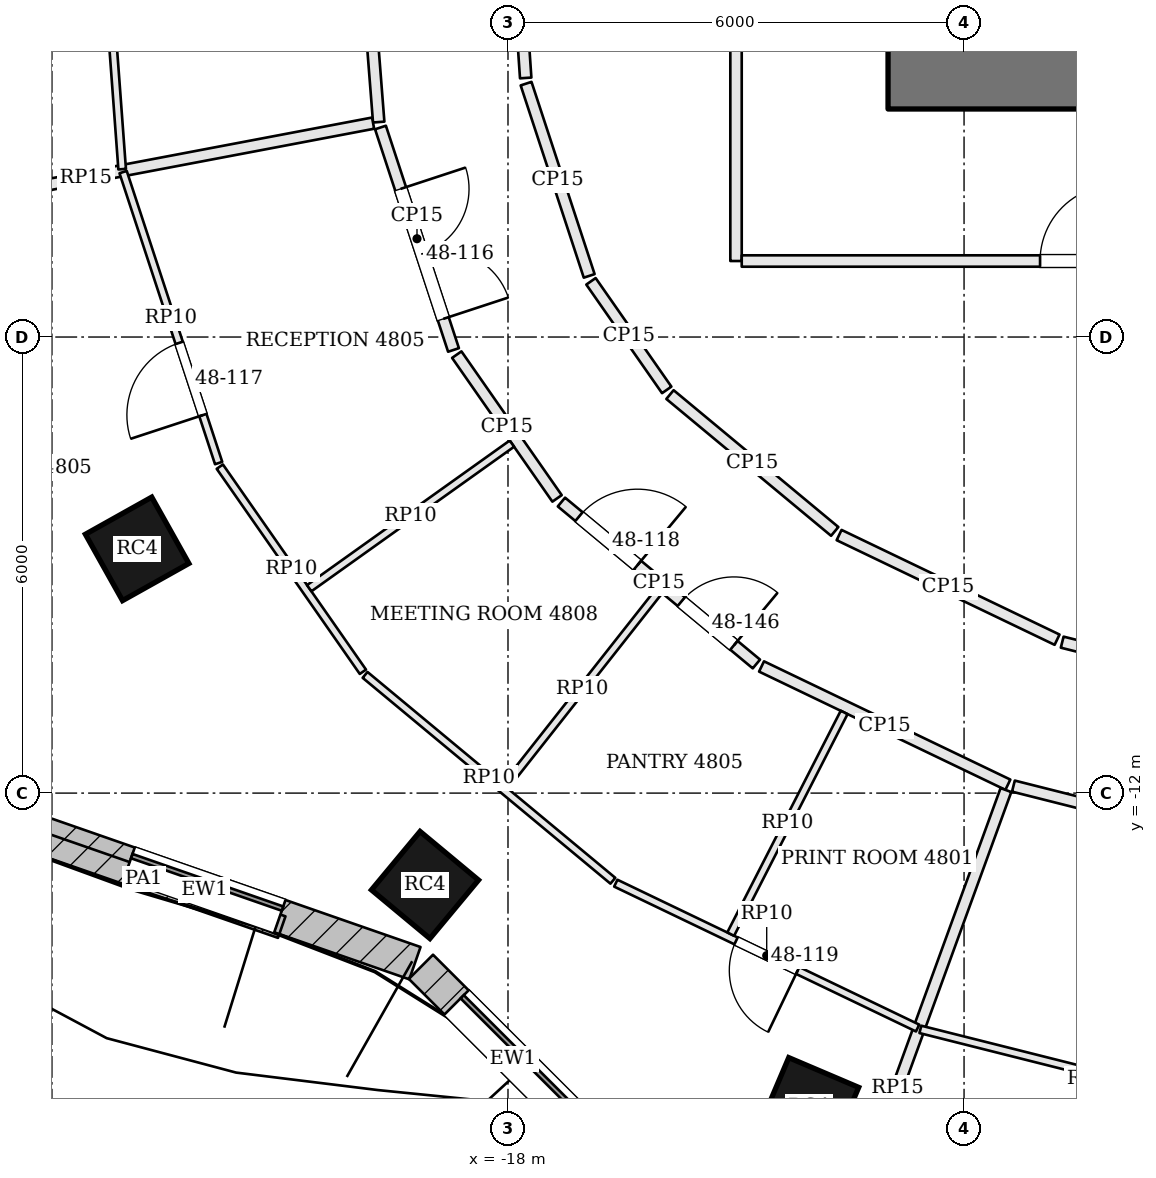
"""IFC4 building model, lengths in metres.
Left out: names, types, materials, properties, quantities, classifications, styles, units other than length and angle.
Written with IfcOpenShell. Run it as: python <this file> out.ifc"""

import sys

from ifc_helpers import new_model, si_unit, direction, frame, frame_2d, origin, origin_2d, place, context, subcontext, project, spatial, rectangle, extrude, element, fill, save


model = new_model("IFC4")
c1 = context("Model", 3, precision=1e-05, world=origin(), true_north=direction((0.0, 1.0)))
c2 = subcontext(c1, "Body", "Model", "MODEL_VIEW")
j1 = project(units=[si_unit("LENGTHUNIT", "METRE"), si_unit("PLANEANGLEUNIT", "RADIAN")], contexts=[c1])
p1 = place(None, origin())
s1 = spatial("IfcSite", under=j1, at=p1, CompositionType="ELEMENT")
p2 = place(p1, origin())
s2 = spatial("IfcBuilding", under=s1, at=p2, CompositionType="ELEMENT")
p3 = place(p2, frame((0.0, 0.0, 197.4)))
s3 = spatial("IfcBuildingStorey", under=s2, at=p3, CompositionType="ELEMENT", Elevation=197.4)
p4 = place(p3, frame((-13.0, -2.6, 0.0), z_axis=(0.0, 0.0, 1.0), x_axis=(1.0, 0.0, 0.0)))
e1 = element("IfcWall", 1, at=p4, inside=s3, PredefinedType="SHEAR", context=c2, shape_type="SweptSolid", body=[
    extrude(rectangle(XDim=26.0, YDim=0.8, at=frame_2d((13.0, 0.0))), origin(), (0.0, 0.0, 1.0), 3.9),
])
p5 = place(p4, frame((8.5, 0.0, 0.0)))
e2 = element("IfcOpeningElement", 2, at=p5, cuts=e1, PredefinedType="OPENING", context=c2, shape_type="SweptSolid", body=[
    extrude(rectangle(XDim=1.0, YDim=2.1, at=frame_2d((0.5, 1.05))), frame((0.0, 0.41, 0.0), z_axis=(0.0, -1.0, 0.0), x_axis=(1.0, 0.0, 0.0)), (0.0, 0.0, 1.0), 0.82),
])
p6 = place(p4, frame((11.025, 0.0, 0.0)))
e3 = element("IfcOpeningElement", 3, at=p6, cuts=e1, PredefinedType="OPENING", context=c2, shape_type="SweptSolid", body=[
    extrude(rectangle(XDim=0.9, YDim=2.1, at=frame_2d((0.45, 1.05))), frame((0.0, 0.41, 0.0), z_axis=(0.0, -1.0, 0.0), x_axis=(1.0, 0.0, 0.0)), (0.0, 0.0, 1.0), 0.82),
])
p7 = place(p4, frame((14.225, 0.0, 0.0)))
e4 = element("IfcOpeningElement", 4, at=p7, cuts=e1, PredefinedType="OPENING", context=c2, shape_type="SweptSolid", body=[
    extrude(rectangle(XDim=0.9, YDim=2.1, at=frame_2d((0.45, 1.05))), frame((0.0, 0.41, 0.0), z_axis=(0.0, -1.0, 0.0), x_axis=(1.0, 0.0, 0.0)), (0.0, 0.0, 1.0), 0.82),
])
p8 = place(p4, frame((16.6, 0.0, 0.0)))
e5 = element("IfcOpeningElement", 5, at=p8, cuts=e1, PredefinedType="OPENING", context=c2, shape_type="SweptSolid", body=[
    extrude(rectangle(XDim=1.0, YDim=2.1, at=frame_2d((0.5, 1.05))), frame((0.0, 0.41, 0.0), z_axis=(0.0, -1.0, 0.0), x_axis=(1.0, 0.0, 0.0)), (0.0, 0.0, 1.0), 0.82),
])
for number, where, z_axis, x_axis in (
    (6, (-22.879, -8.787, 0.0), (0.0, 0.0, 1.0), (0.489, -0.873, 0.0)),
    (7, (-19.092, -13.209, 0.0), (0.0, 0.0, 1.0), (0.769, -0.639, 0.0)),
    (8, (-14.042, -16.136, 0.0), (0.0, 0.0, 1.0), (0.92, -0.392, 0.0)),
):
    element("IfcColumn", number, at=place(p3, frame(where, z_axis=z_axis, x_axis=x_axis)), inside=s3, PredefinedType="COLUMN", context=c2, shape_type="SweptSolid", body=[
        extrude(rectangle(XDim=1.0, YDim=1.0, at=origin_2d()), origin(), (0.0, 0.0, 1.0), 3.9),
    ])
p9 = place(p3, frame((-24.761, -12.31, 0.0), z_axis=(0.0, 0.0, 1.0), x_axis=(0.944397305248, -0.328806523414, 0.0)))
e9 = element("IfcWall", 9, at=p9, inside=s3, PredefinedType="SOLIDWALL", context=c2, shape_type="SweptSolid", body=[
    extrude(rectangle(XDim=5.862, YDim=0.45, at=frame_2d((2.931, 0.0))), origin(), (0.0, 0.0, 1.0), 3.7),
])
p10 = place(p9, frame((1.881, 0.0, 0.9)))
e10 = element("IfcOpeningElement", 10, at=p10, cuts=e9, PredefinedType="OPENING", context=c2, shape_type="SweptSolid", body=[
    extrude(rectangle(XDim=2.1, YDim=2.3, at=frame_2d((1.05, 1.15))), frame((0.0, 0.235, 0.0), z_axis=(0.0, -1.0, 0.0), x_axis=(1.0, 0.0, 0.0)), (0.0, 0.0, 1.0), 0.47),
])
p11 = place(p3, frame((-19.145, -14.285, 0.0), z_axis=(0.0, 0.0, 1.0), x_axis=(0.707427521052, -0.706785895769, 0.0)))
e11 = element("IfcWall", 11, at=p11, inside=s3, PredefinedType="SOLIDWALL", context=c2, shape_type="SweptSolid", body=[
    extrude(rectangle(XDim=3.425, YDim=0.45, at=frame_2d((1.712, 0.0))), origin(), (0.0, 0.0, 1.0), 3.7),
])
p12 = place(p11, frame((0.662, 0.0, 0.9)))
e12 = element("IfcOpeningElement", 12, at=p12, cuts=e11, PredefinedType="OPENING", context=c2, shape_type="SweptSolid", body=[
    extrude(rectangle(XDim=2.1, YDim=2.3, at=frame_2d((1.05, 1.15))), frame((0.0, 0.235, 0.0), z_axis=(0.0, -1.0, 0.0), x_axis=(1.0, 0.0, 0.0)), (0.0, 0.0, 1.0), 0.47),
])
p13 = place(p3, frame((-24.605, -12.5, 3.9), z_axis=(0.0, 0.0, 1.0), x_axis=(0.944373295981, -0.328875474668, 0.0)))
e13 = element("IfcWall", 13, at=p13, inside=s3, PredefinedType="PARAPET", context=c2, shape_type="SweptSolid", body=[
    extrude(rectangle(XDim=3.842, YDim=0.3, at=frame_2d((1.921, 0.0))), origin(), (0.0, 0.0, 1.0), 1.1),
])
p14 = place(p3, frame((-19.943, -0.075, 0.0), z_axis=(0.0, 0.0, 1.0), x_axis=(0.07795234724, -0.996957086117, 0.0)))
e14 = element("IfcWall", 14, at=p14, inside=s3, PredefinedType="PARTITIONING", context=c2, shape_type="SweptSolid", body=[
    extrude(rectangle(XDim=3.107, YDim=0.15, at=frame_2d((1.553, 0.0))), origin(), (0.0, 0.0, 1.0), 3.084),
])
p15 = place(p14, frame((1.15, 0.0, 0.0)))
e15 = element("IfcOpeningElement", 15, at=p15, cuts=e14, PredefinedType="OPENING", context=c2, shape_type="SweptSolid", body=[
    extrude(rectangle(XDim=0.9, YDim=2.1, at=frame_2d((0.45, 1.05))), frame((0.0, 0.085, 0.0), z_axis=(0.0, -1.0, 0.0), x_axis=(1.0, 0.0, 0.0)), (0.0, 0.0, 1.0), 0.17),
])
p16 = place(p3, frame((-27.332, -4.618, 0.0), z_axis=(0.0, 0.0, 1.0), x_axis=(0.982506256139, 0.186229580485, 0.0)))
e16 = element("IfcWall", 16, at=p16, inside=s3, PredefinedType="PARTITIONING", context=c2, shape_type="SweptSolid", body=[
    extrude(rectangle(XDim=7.691, YDim=0.15, at=frame_2d((3.846, 0.0))), origin(), (0.0, 0.0, 1.0), 3.084),
])
p17 = place(p3, frame((-19.677, -3.243, 0.0), z_axis=(0.0, 0.0, 1.0), x_axis=(0.311873272737, -0.950123708657, 0.0)))
e17 = element("IfcWall", 17, at=p17, inside=s3, PredefinedType="PARTITIONING", context=c2, shape_type="SweptSolid", body=[
    extrude(rectangle(XDim=3.08, YDim=0.15, at=frame_2d((1.54, 0.0))), origin(), (0.0, 0.0, 1.0), 3.084),
])
p18 = place(p17, frame((0.85, 0.0, 0.0)))
e18 = element("IfcOpeningElement", 18, at=p18, cuts=e17, PredefinedType="OPENING", context=c2, shape_type="SweptSolid", body=[
    extrude(rectangle(XDim=1.8, YDim=2.1, at=frame_2d((0.9, 1.05))), frame((0.0, 0.085, 0.0), z_axis=(0.0, -1.0, 0.0), x_axis=(1.0, 0.0, 0.0)), (0.0, 0.0, 1.0), 0.17),
])
p19 = place(p3, frame((-18.674, -6.232, 0.0), z_axis=(0.0, 0.0, 1.0), x_axis=(0.572118665737, -0.820170855563, 0.0)))
e19 = element("IfcWall", 19, at=p19, inside=s3, PredefinedType="PARTITIONING", context=c2, shape_type="SweptSolid", body=[
    extrude(rectangle(XDim=2.306, YDim=0.15, at=frame_2d((1.153, 0.0))), origin(), (0.0, 0.0, 1.0), 3.084),
])
p20 = place(p3, frame((-17.297, -8.171, 0.0), z_axis=(0.0, 0.0, 1.0), x_axis=(0.769228575061, -0.638973707839, 0.0)))
e20 = element("IfcWall", 20, at=p20, inside=s3, PredefinedType="PARTITIONING", context=c2, shape_type="SweptSolid", body=[
    extrude(rectangle(XDim=3.334, YDim=0.15, at=frame_2d((1.667, 0.0))), origin(), (0.0, 0.0, 1.0), 3.084),
])
p21 = place(p20, frame((0.3, 0.0, 0.0)))
e21 = element("IfcOpeningElement", 21, at=p21, cuts=e20, PredefinedType="OPENING", context=c2, shape_type="SweptSolid", body=[
    extrude(rectangle(XDim=1.0, YDim=2.4, at=frame_2d((0.5, 1.2))), frame((0.0, 0.085, 0.0), z_axis=(0.0, -1.0, 0.0), x_axis=(1.0, 0.0, 0.0)), (0.0, 0.0, 1.0), 0.17),
])
p22 = place(p20, frame((2.05, 0.0, 0.0)))
e22 = element("IfcOpeningElement", 22, at=p22, cuts=e20, PredefinedType="OPENING", context=c2, shape_type="SweptSolid", body=[
    extrude(rectangle(XDim=0.9, YDim=2.1, at=frame_2d((0.45, 1.05))), frame((0.0, 0.085, 0.0), z_axis=(0.0, -1.0, 0.0), x_axis=(1.0, 0.0, 0.0)), (0.0, 0.0, 1.0), 0.17),
])
p23 = place(p3, frame((-14.664, -10.334, 0.0), z_axis=(0.0, 0.0, 1.0), x_axis=(0.901523057468, -0.432731067585, 0.0)))
e23 = element("IfcWall", 23, at=p23, inside=s3, PredefinedType="PARTITIONING", context=c2, shape_type="SweptSolid", body=[
    extrude(rectangle(XDim=3.595, YDim=0.15, at=frame_2d((1.797, 0.0))), origin(), (0.0, 0.0, 1.0), 3.084),
])
p24 = place(p3, frame((-14.301, -19.789, 0.0), z_axis=(0.0, 0.0, 1.0), x_axis=(0.34224178248, 0.939611921128, 0.0)))
e24 = element("IfcWall", 24, at=p24, inside=s3, PredefinedType="PARTITIONING", context=c2, shape_type="SweptSolid", body=[
    extrude(rectangle(XDim=8.332, YDim=0.15, at=frame_2d((4.166, 0.0))), origin(), (0.0, 0.0, 1.0), 3.084),
])
p25 = place(p3, frame((-11.351, -11.908, 0.0), z_axis=(0.0, 0.0, 1.0), x_axis=(0.969630935796, -0.244572787421, 0.0)))
e25 = element("IfcWall", 25, at=p25, inside=s3, PredefinedType="PARTITIONING", context=c2, shape_type="SweptSolid", body=[
    extrude(rectangle(XDim=4.68, YDim=0.15, at=frame_2d((2.34, 0.0))), origin(), (0.0, 0.0, 1.0), 3.084),
])
p26 = place(p25, frame((1.751, 0.0, 0.0)))
e26 = element("IfcOpeningElement", 26, at=p26, cuts=e25, PredefinedType="OPENING", context=c2, shape_type="SweptSolid", body=[
    extrude(rectangle(XDim=1.8, YDim=2.1, at=frame_2d((0.9, 1.05))), frame((0.0, 0.085, 0.0), z_axis=(0.0, -1.0, 0.0), x_axis=(1.0, 0.0, 0.0)), (0.0, 0.0, 1.0), 0.17),
])
p27 = place(p3, frame((-6.553, -11.056, 0.0), z_axis=(0.0, 0.0, 1.0), x_axis=(-0.970004917182, 0.243085294995, 0.0)))
e27 = element("IfcWall", 27, at=p27, inside=s3, PredefinedType="PARTITIONING", context=c2, shape_type="SweptSolid", body=[
    extrude(rectangle(XDim=4.284, YDim=0.15, at=frame_2d((2.142, 0.0))), origin(), (0.0, 0.0, 1.0), 3.084),
])
p28 = place(p3, frame((-10.776, -9.982, 0.0), z_axis=(0.0, 0.0, 1.0), x_axis=(-0.901511079436, 0.432756020933, 0.0)))
e28 = element("IfcWall", 28, at=p28, inside=s3, PredefinedType="PARTITIONING", context=c2, shape_type="SweptSolid", body=[
    extrude(rectangle(XDim=3.181, YDim=0.15, at=frame_2d((1.59, 0.0))), origin(), (0.0, 0.0, 1.0), 3.084),
])
p29 = place(p3, frame((-13.702, -8.557, 0.0), z_axis=(0.0, 0.0, 1.0), x_axis=(-0.769221825067, 0.638981833733, 0.0)))
e29 = element("IfcWall", 29, at=p29, inside=s3, PredefinedType="PARTITIONING", context=c2, shape_type="SweptSolid", body=[
    extrude(rectangle(XDim=2.817, YDim=0.15, at=frame_2d((1.409, 0.0))), origin(), (0.0, 0.0, 1.0), 3.084),
])
p30 = place(p3, frame((-15.912, -6.696, 0.0), z_axis=(0.0, 0.0, 1.0), x_axis=(-0.572078533763, 0.820198848578, 0.0)))
e30 = element("IfcWall", 30, at=p30, inside=s3, PredefinedType="PARTITIONING", context=c2, shape_type="SweptSolid", body=[
    extrude(rectangle(XDim=1.742, YDim=0.15, at=frame_2d((0.871, 0.0))), origin(), (0.0, 0.0, 1.0), 3.084),
])
p31 = place(p3, frame((-16.932, -5.196, 0.0), z_axis=(0.0, 0.0, 1.0), x_axis=(-0.311904957484, 0.950113307715, 0.0)))
e31 = element("IfcWall", 31, at=p31, inside=s3, PredefinedType="PARTITIONING", context=c2, shape_type="SweptSolid", body=[
    extrude(rectangle(XDim=2.662, YDim=0.15, at=frame_2d((1.331, 0.0))), origin(), (0.0, 0.0, 1.0), 3.084),
])
p32 = place(p3, frame((-17.767, -2.592, 0.0), z_axis=(0.0, 0.0, 1.0), x_axis=(-0.068140828228, 0.997675712608, 0.0)))
e32 = element("IfcWall", 32, at=p32, inside=s3, PredefinedType="PARTITIONING", context=c2, shape_type="SweptSolid", body=[
    extrude(rectangle(XDim=2.598, YDim=0.15, at=frame_2d((1.299, 0.0))), origin(), (0.0, 0.0, 1.0), 3.084),
])
p33 = place(p3, frame((-15.0, 7.423, 0.0), z_axis=(0.0, 0.0, 1.0), x_axis=(0.0, -1.0, 0.0)))
e33 = element("IfcWall", 33, at=p33, inside=s3, PredefinedType="PARTITIONING", context=c2, shape_type="SweptSolid", body=[
    extrude(rectangle(XDim=12.423, YDim=0.15, at=frame_2d((6.211, 0.0))), origin(), (0.0, 0.0, 1.0), 3.084),
])
p34 = place(p33, frame((3.174, 0.0, 0.0)))
e34 = element("IfcOpeningElement", 34, at=p34, cuts=e33, PredefinedType="OPENING", context=c2, shape_type="SweptSolid", body=[
    extrude(rectangle(XDim=1.0, YDim=2.1, at=frame_2d((0.5, 1.05))), frame((0.0, 0.085, 0.0), z_axis=(0.0, -1.0, 0.0), x_axis=(1.0, 0.0, 0.0)), (0.0, 0.0, 1.0), 0.17),
])
p35 = place(p3, frame((-14.925, -5.0, 0.0), z_axis=(0.0, 0.0, 1.0), x_axis=(1.0, 0.0, 0.0)))
e35 = element("IfcWall", 35, at=p35, inside=s3, PredefinedType="PARTITIONING", context=c2, shape_type="SweptSolid", body=[
    extrude(rectangle(XDim=29.925, YDim=0.15, at=frame_2d((14.962, 0.0))), origin(), (0.0, 0.0, 1.0), 3.084),
])
p36 = place(p35, frame((3.925, 0.0, 0.0)))
e36 = element("IfcOpeningElement", 36, at=p36, cuts=e35, PredefinedType="OPENING", context=c2, shape_type="SweptSolid", body=[
    extrude(rectangle(XDim=1.0, YDim=2.1, at=frame_2d((0.5, 1.05))), frame((0.0, 0.085, 0.0), z_axis=(0.0, -1.0, 0.0), x_axis=(1.0, 0.0, 0.0)), (0.0, 0.0, 1.0), 0.17),
])
p37 = place(p35, frame((14.025, 0.0, 0.0)))
e37 = element("IfcOpeningElement", 37, at=p37, cuts=e35, PredefinedType="OPENING", context=c2, shape_type="SweptSolid", body=[
    extrude(rectangle(XDim=1.8, YDim=2.1, at=frame_2d((0.9, 1.05))), frame((0.0, 0.085, 0.0), z_axis=(0.0, -1.0, 0.0), x_axis=(1.0, 0.0, 0.0)), (0.0, 0.0, 1.0), 0.17),
])
p38 = place(p35, frame((24.925, 0.0, 0.0)))
e38 = element("IfcOpeningElement", 38, at=p38, cuts=e35, PredefinedType="OPENING", context=c2, shape_type="SweptSolid", body=[
    extrude(rectangle(XDim=1.0, YDim=2.1, at=frame_2d((0.5, 1.05))), frame((0.0, 0.085, 0.0), z_axis=(0.0, -1.0, 0.0), x_axis=(1.0, 0.0, 0.0)), (0.0, 0.0, 1.0), 0.17),
])
p39 = place(p3, frame((-23.076, -3.792, 0.0), z_axis=(0.0, 0.0, 1.0), x_axis=(-0.073784165765, 0.99727423354, 0.0)))
e39 = element("IfcWall", 39, at=p39, inside=s3, PredefinedType="PARTITIONING", context=c2, shape_type="SweptSolid", body=[
    extrude(rectangle(XDim=3.802, YDim=0.1, at=frame_2d((1.901, 0.0))), origin(), (0.0, 0.0, 1.0), 3.084),
])
p40 = place(p39, frame((2.146, 0.0, 0.0)))
e40 = element("IfcOpeningElement", 40, at=p40, cuts=e39, PredefinedType="OPENING", context=c2, shape_type="SweptSolid", body=[
    extrude(rectangle(XDim=0.9, YDim=2.1, at=frame_2d((0.45, 1.05))), frame((0.0, 0.06, 0.0), z_axis=(0.0, -1.0, 0.0), x_axis=(1.0, 0.0, 0.0)), (0.0, 0.0, 1.0), 0.12),
])
p41 = place(p3, frame((-12.611, -15.091, 0.0), z_axis=(0.0, 0.0, 1.0), x_axis=(-0.901527382061, 0.432722057901, 0.0)))
e41 = element("IfcWall", 41, at=p41, inside=s3, PredefinedType="PARTITIONING", context=c2, shape_type="SweptSolid", body=[
    extrude(rectangle(XDim=4.405, YDim=0.1, at=frame_2d((2.202, 0.0))), origin(), (0.0, 0.0, 1.0), 3.084),
])
p42 = place(p41, frame((1.75, 0.0, 0.0)))
e42 = element("IfcOpeningElement", 42, at=p42, cuts=e41, PredefinedType="OPENING", context=c2, shape_type="SweptSolid", body=[
    extrude(rectangle(XDim=0.9, YDim=2.1, at=frame_2d((0.45, 1.05))), frame((0.0, 0.06, 0.0), z_axis=(0.0, -1.0, 0.0), x_axis=(1.0, 0.0, 0.0)), (0.0, 0.0, 1.0), 0.12),
])
p43 = place(p3, frame((-16.62, -13.153, 0.0), z_axis=(0.0, 0.0, 1.0), x_axis=(-0.76922129881, 0.638982467253, 0.0)))
e43 = element("IfcWall", 43, at=p43, inside=s3, PredefinedType="PARTITIONING", context=c2, shape_type="SweptSolid", body=[
    extrude(rectangle(XDim=4.238, YDim=0.1, at=frame_2d((2.119, 0.0))), origin(), (0.0, 0.0, 1.0), 3.084),
])
p44 = place(p3, frame((-19.909, -10.404, 0.0), z_axis=(0.0, 0.0, 1.0), x_axis=(-0.572111951901, 0.820175538828, 0.0)))
e44 = element("IfcWall", 44, at=p44, inside=s3, PredefinedType="PARTITIONING", context=c2, shape_type="SweptSolid", body=[
    extrude(rectangle(XDim=3.29, YDim=0.1, at=frame_2d((1.645, 0.0))), origin(), (0.0, 0.0, 1.0), 3.084),
])
p45 = place(p3, frame((-21.807, -7.658, 0.0), z_axis=(0.0, 0.0, 1.0), x_axis=(-0.31193452411, 0.950103601019, 0.0)))
e45 = element("IfcWall", 45, at=p45, inside=s3, PredefinedType="PARTITIONING", context=c2, shape_type="SweptSolid", body=[
    extrude(rectangle(XDim=4.029, YDim=0.1, at=frame_2d((2.015, 0.0))), origin(), (0.0, 0.0, 1.0), 3.084),
])
p46 = place(p45, frame((0.664, 0.0, 0.0)))
e46 = element("IfcOpeningElement", 46, at=p46, cuts=e45, PredefinedType="OPENING", context=c2, shape_type="SweptSolid", body=[
    extrude(rectangle(XDim=1.0, YDim=2.1, at=frame_2d((0.5, 1.05))), frame((0.0, 0.06, 0.0), z_axis=(0.0, -1.0, 0.0), x_axis=(1.0, 0.0, 0.0)), (0.0, 0.0, 1.0), 0.12),
])
p47 = place(p3, frame((-17.949, -7.403, 0.0), z_axis=(0.0, 0.0, 1.0), x_axis=(-0.814111063542, -0.58070920108, 0.0)))
e47 = element("IfcWall", 47, at=p47, inside=s3, PredefinedType="PARTITIONING", context=c2, shape_type="SweptSolid", body=[
    extrude(rectangle(XDim=3.275, YDim=0.1, at=frame_2d((1.638, 0.0))), origin(), (0.0, 0.0, 1.0), 3.084),
])
p48 = place(p3, frame((-16.009, -9.338, 0.0), z_axis=(0.0, 0.0, 1.0), x_axis=(-0.619071458302, -0.785334660839, 0.0)))
e48 = element("IfcWall", 48, at=p48, inside=s3, PredefinedType="PARTITIONING", context=c2, shape_type="SweptSolid", body=[
    extrude(rectangle(XDim=3.276, YDim=0.1, at=frame_2d((1.638, 0.0))), origin(), (0.0, 0.0, 1.0), 3.084),
])
p49 = place(p3, frame((-13.578, -10.939, 0.0), z_axis=(0.0, 0.0, 1.0), x_axis=(-0.455540357247, -0.890215132942, 0.0)))
e49 = element("IfcWall", 49, at=p49, inside=s3, PredefinedType="PARTITIONING", context=c2, shape_type="SweptSolid", body=[
    extrude(rectangle(XDim=3.276, YDim=0.1, at=frame_2d((1.638, 0.0))), origin(), (0.0, 0.0, 1.0), 3.084),
])
p50 = place(p3, frame((-7.427, -16.404, 0.0), z_axis=(0.0, 0.0, 1.0), x_axis=(-0.969770679243, 0.244018092937, 0.0)))
e50 = element("IfcWall", 50, at=p50, inside=s3, PredefinedType="PARTITIONING", context=c2, shape_type="SweptSolid", body=[
    extrude(rectangle(XDim=5.308, YDim=0.1, at=frame_2d((2.654, 0.0))), origin(), (0.0, 0.0, 1.0), 3.084),
])
p51 = place(p50, frame((1.85, 0.0, 0.0)))
e51 = element("IfcOpeningElement", 51, at=p51, cuts=e50, PredefinedType="OPENING", context=c2, shape_type="SweptSolid", body=[
    extrude(rectangle(XDim=1.0, YDim=2.1, at=frame_2d((0.5, 1.05))), frame((0.0, 0.06, 0.0), z_axis=(0.0, -1.0, 0.0), x_axis=(1.0, 0.0, 0.0)), (0.0, 0.0, 1.0), 0.12),
])
p52 = place(p10, origin())
e52 = element("IfcWindow", 52, at=p52, inside=s3, PartitioningType="SINGLE_PANEL", PredefinedType="WINDOW", context=c2, shape_type="SweptSolid", body=[
    extrude(rectangle(XDim=2.1, YDim=2.3, at=frame_2d((1.05, 1.15))), frame((0.0, 0.135, 0.0), z_axis=(0.0, -1.0, 0.0), x_axis=(1.0, 0.0, 0.0)), (0.0, 0.0, 1.0), 0.06),
])
fill(e10, e52)
p53 = place(p12, origin())
e53 = element("IfcWindow", 53, at=p53, inside=s3, PartitioningType="SINGLE_PANEL", PredefinedType="WINDOW", context=c2, shape_type="SweptSolid", body=[
    extrude(rectangle(XDim=2.1, YDim=2.3, at=frame_2d((1.05, 1.15))), frame((0.0, 0.135, 0.0), z_axis=(0.0, -1.0, 0.0), x_axis=(1.0, 0.0, 0.0)), (0.0, 0.0, 1.0), 0.06),
])
fill(e12, e53)
p54 = place(p18, origin())
e54 = element("IfcDoor", 54, at=p54, inside=s3, OperationType="DOUBLE_DOOR_SINGLE_SWING", PredefinedType="DOOR", context=c2, shape_type="SweptSolid", body=[
    extrude(rectangle(XDim=1.8, YDim=2.1, at=frame_2d((0.9, 1.05))), frame((0.0, 0.025, 0.0), z_axis=(0.0, -1.0, 0.0), x_axis=(1.0, 0.0, 0.0)), (0.0, 0.0, 1.0), 0.05),
])
fill(e18, e54)
p55 = place(p46, origin())
e55 = element("IfcDoor", 55, at=p55, inside=s3, OperationType="SINGLE_SWING_LEFT", PredefinedType="DOOR", context=c2, shape_type="SweptSolid", body=[
    extrude(rectangle(XDim=1.0, YDim=2.1, at=frame_2d((0.5, 1.05))), frame((0.0, 0.025, 0.0), z_axis=(0.0, -1.0, 0.0), x_axis=(1.0, 0.0, 0.0)), (0.0, 0.0, 1.0), 0.05),
])
fill(e46, e55)
p56 = place(p21, origin())
e56 = element("IfcDoor", 56, at=p56, inside=s3, OperationType="SINGLE_SWING_RIGHT", PredefinedType="DOOR", context=c2, shape_type="SweptSolid", body=[
    extrude(rectangle(XDim=1.0, YDim=2.4, at=frame_2d((0.5, 1.2))), frame((0.0, 0.025, 0.0), z_axis=(0.0, -1.0, 0.0), x_axis=(1.0, 0.0, 0.0)), (0.0, 0.0, 1.0), 0.05),
])
fill(e21, e56)
p57 = place(p42, origin())
e57 = element("IfcDoor", 57, at=p57, inside=s3, OperationType="SINGLE_SWING_LEFT", PredefinedType="DOOR", context=c2, shape_type="SweptSolid", body=[
    extrude(rectangle(XDim=0.9, YDim=2.1, at=frame_2d((0.45, 1.05))), frame((0.0, 0.025, 0.0), z_axis=(0.0, -1.0, 0.0), x_axis=(1.0, 0.0, 0.0)), (0.0, 0.0, 1.0), 0.05),
])
fill(e42, e57)
p58 = place(p36, origin())
e58 = element("IfcDoor", 58, at=p58, inside=s3, OperationType="SINGLE_SWING_RIGHT", PredefinedType="DOOR", context=c2, shape_type="SweptSolid", body=[
    extrude(rectangle(XDim=1.0, YDim=2.1, at=frame_2d((0.5, 1.05))), frame((0.0, 0.025, 0.0), z_axis=(0.0, -1.0, 0.0), x_axis=(1.0, 0.0, 0.0)), (0.0, 0.0, 1.0), 0.05),
])
fill(e36, e58)
p59 = place(p22, origin())
e59 = element("IfcDoor", 59, at=p59, inside=s3, OperationType="SINGLE_SWING_RIGHT", PredefinedType="DOOR", context=c2, shape_type="SweptSolid", body=[
    extrude(rectangle(XDim=0.9, YDim=2.1, at=frame_2d((0.45, 1.05))), frame((0.0, 0.025, 0.0), z_axis=(0.0, -1.0, 0.0), x_axis=(1.0, 0.0, 0.0)), (0.0, 0.0, 1.0), 0.05),
])
fill(e22, e59)
save(model, sys.argv[1])
